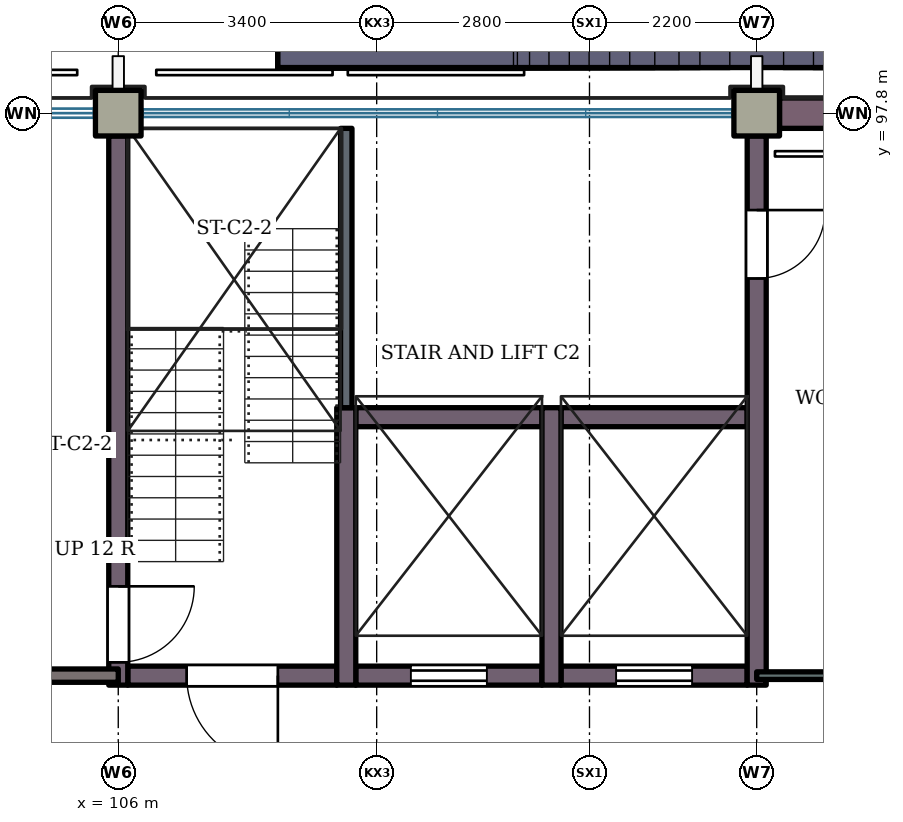
"""IFC4 building model, lengths in metres.
Left out: names, types, materials, properties, quantities, classifications, styles, units other than length and angle.
Written with IfcOpenShell. Run it as: python <this file> out.ifc"""

import sys

from ifc_helpers import new_model, si_unit, direction, frame, frame_2d, origin, origin_2d, place, context, subcontext, project, spatial, rectangle, extrude, element, fill, save


model = new_model("IFC4")
c1 = context("Model", 3, precision=1e-05, world=origin(), true_north=direction((0.0, 1.0)))
c2 = subcontext(c1, "Body", "Model", "MODEL_VIEW")
j1 = project(units=[si_unit("LENGTHUNIT", "METRE"), si_unit("PLANEANGLEUNIT", "RADIAN")], contexts=[c1])
p1 = place(None, origin())
s1 = spatial("IfcSite", under=j1, at=p1, CompositionType="ELEMENT")
p2 = place(p1, origin())
s2 = spatial("IfcBuilding", under=s1, at=p2, CompositionType="ELEMENT")
p3 = place(p2, frame((0.0, 0.0, 8.4)))
s3 = spatial("IfcBuildingStorey", under=s2, at=p3, CompositionType="ELEMENT", Elevation=8.4)
for number, where, z_axis, x_axis in (
    (1, (106.0, 97.8, 0.0), (0.0, 0.0, 1.0), (1.0, 0.0, 0.0)),
    (2, (114.4, 97.8, 0.0), (0.0, 0.0, 1.0), (1.0, 0.0, 0.0)),
):
    element("IfcColumn", number, at=place(p3, frame(where, z_axis=z_axis, x_axis=x_axis)), inside=s3, PredefinedType="COLUMN", context=c2, shape_type="SweptSolid", body=[
        extrude(rectangle(XDim=0.6, YDim=0.6, at=origin_2d()), origin(), (0.0, 0.0, 1.0), 4.2),
    ])
p4 = place(p3, frame((106.125, 90.4, 0.0), z_axis=(0.0, 0.0, 1.0), x_axis=(1.0, 0.0, 0.0)))
e3 = element("IfcWall", 3, at=p4, inside=s3, PredefinedType="SHEAR", context=c2, shape_type="SweptSolid", body=[
    extrude(rectangle(XDim=2.75, YDim=0.25, at=frame_2d((1.375, 0.0))), origin(), (0.0, 0.0, 1.0), 4.2),
])
p5 = place(p4, frame((0.775, 0.0, 0.0)))
e4 = element("IfcOpeningElement", 4, at=p5, cuts=e3, PredefinedType="OPENING", context=c2, shape_type="SweptSolid", body=[
    extrude(rectangle(XDim=1.2, YDim=2.1, at=frame_2d((0.6, 1.05))), frame((0.0, 0.135, 0.0), z_axis=(0.0, -1.0, 0.0), x_axis=(1.0, 0.0, 0.0)), (0.0, 0.0, 1.0), 0.27),
])
p6 = place(p3, frame((109.125, 90.4, 0.0), z_axis=(0.0, 0.0, 1.0), x_axis=(1.0, 0.0, 0.0)))
e5 = element("IfcWall", 5, at=p6, inside=s3, PredefinedType="SHEAR", context=c2, shape_type="SweptSolid", body=[
    extrude(rectangle(XDim=2.45, YDim=0.25, at=frame_2d((1.225, 0.0))), origin(), (0.0, 0.0, 1.0), 4.2),
])
p7 = place(p6, frame((0.725, 0.0, 0.0)))
e6 = element("IfcOpeningElement", 6, at=p7, cuts=e5, PredefinedType="OPENING", context=c2, shape_type="SweptSolid", body=[
    extrude(rectangle(XDim=1.0, YDim=2.1, at=frame_2d((0.5, 1.05))), frame((0.0, 0.135, 0.0), z_axis=(0.0, -1.0, 0.0), x_axis=(1.0, 0.0, 0.0)), (0.0, 0.0, 1.0), 0.27),
])
p8 = place(p3, frame((111.825, 90.4, 0.0), z_axis=(0.0, 0.0, 1.0), x_axis=(1.0, 0.0, 0.0)))
e7 = element("IfcWall", 7, at=p8, inside=s3, PredefinedType="SHEAR", context=c2, shape_type="SweptSolid", body=[
    extrude(rectangle(XDim=2.45, YDim=0.25, at=frame_2d((1.225, 0.0))), origin(), (0.0, 0.0, 1.0), 4.2),
])
p9 = place(p8, frame((0.725, 0.0, 0.0)))
e8 = element("IfcOpeningElement", 8, at=p9, cuts=e7, PredefinedType="OPENING", context=c2, shape_type="SweptSolid", body=[
    extrude(rectangle(XDim=1.0, YDim=2.1, at=frame_2d((0.5, 1.05))), frame((0.0, 0.135, 0.0), z_axis=(0.0, -1.0, 0.0), x_axis=(1.0, 0.0, 0.0)), (0.0, 0.0, 1.0), 0.27),
])
for number, where, z_axis, x_axis in (
    (9, (109.125, 93.8, 0.0), (0.0, 0.0, 1.0), (1.0, 0.0, 0.0)),
    (10, (111.825, 93.8, 0.0), (0.0, 0.0, 1.0), (1.0, 0.0, 0.0)),
):
    element("IfcWall", number, at=place(p3, frame(where, z_axis=z_axis, x_axis=x_axis)), inside=s3, PredefinedType="SHEAR", context=c2, shape_type="SweptSolid", body=[
        extrude(rectangle(XDim=2.45, YDim=0.25, at=frame_2d((1.225, 0.0))), origin(), (0.0, 0.0, 1.0), 4.2),
    ])
p10 = place(p3, frame((106.0, 90.275, 0.0), z_axis=(0.0, 0.0, 1.0), x_axis=(0.0, 1.0, 0.0)))
e11 = element("IfcWall", 11, at=p10, inside=s3, PredefinedType="SHEAR", context=c2, shape_type="SweptSolid", body=[
    extrude(rectangle(XDim=7.225, YDim=0.25, at=frame_2d((3.613, 0.0))), origin(), (0.0, 0.0, 1.0), 4.2),
])
p11 = place(p10, frame((0.3, 0.0, 0.0)))
e12 = element("IfcOpeningElement", 12, at=p11, cuts=e11, PredefinedType="OPENING", context=c2, shape_type="SweptSolid", body=[
    extrude(rectangle(XDim=1.0, YDim=2.1, at=frame_2d((0.5, 1.05))), frame((0.0, 0.135, 0.0), z_axis=(0.0, -1.0, 0.0), x_axis=(1.0, 0.0, 0.0)), (0.0, 0.0, 1.0), 0.27),
])
for number, where, z_axis, x_axis in (
    (13, (109.0, 90.275, 0.0), (0.0, 0.0, 1.0), (0.0, 1.0, 0.0)),
    (14, (111.7, 90.275, 0.0), (0.0, 0.0, 1.0), (0.0, 1.0, 0.0)),
):
    element("IfcWall", number, at=place(p3, frame(where, z_axis=z_axis, x_axis=x_axis)), inside=s3, PredefinedType="SHEAR", context=c2, shape_type="SweptSolid", body=[
        extrude(rectangle(XDim=3.65, YDim=0.25, at=frame_2d((1.825, 0.0))), origin(), (0.0, 0.0, 1.0), 4.2),
    ])
p12 = place(p3, frame((114.4, 90.275, 0.0), z_axis=(0.0, 0.0, 1.0), x_axis=(0.0, 1.0, 0.0)))
e15 = element("IfcWall", 15, at=p12, inside=s3, PredefinedType="SHEAR", context=c2, shape_type="SweptSolid", body=[
    extrude(rectangle(XDim=7.225, YDim=0.25, at=frame_2d((3.613, 0.0))), origin(), (0.0, 0.0, 1.0), 4.2),
])
p13 = place(p12, frame((5.35, 0.0, 0.0)))
e16 = element("IfcOpeningElement", 16, at=p13, cuts=e15, PredefinedType="OPENING", context=c2, shape_type="SweptSolid", body=[
    extrude(rectangle(XDim=0.9, YDim=2.1, at=frame_2d((0.45, 1.05))), frame((0.0, 0.135, 0.0), z_axis=(0.0, -1.0, 0.0), x_axis=(1.0, 0.0, 0.0)), (0.0, 0.0, 1.0), 0.27),
])
p14 = place(p3, frame((114.7, 97.8, 0.0), z_axis=(0.0, 0.0, 1.0), x_axis=(1.0, 0.0, 0.0)))
e17 = element("IfcWall", 17, at=p14, inside=s3, PredefinedType="SOLIDWALL", context=c2, shape_type="SweptSolid", body=[
    extrude(rectangle(XDim=7.8, YDim=0.4, at=frame_2d((3.9, 0.0))), origin(), (0.0, 0.0, 1.0), 3.32),
])
p15 = place(p14, frame((0.8, 0.0, 2.1)))
e18 = element("IfcOpeningElement", 18, at=p15, cuts=e17, PredefinedType="OPENING", context=c2, shape_type="SweptSolid", body=[
    extrude(rectangle(XDim=0.6, YDim=0.9, at=frame_2d((0.3, 0.45))), frame((0.0, 0.21, 0.0), z_axis=(0.0, -1.0, 0.0), x_axis=(1.0, 0.0, 0.0)), (0.0, 0.0, 1.0), 0.42),
])
p16 = place(p14, frame((3.525, 0.0, 2.1)))
e19 = element("IfcOpeningElement", 19, at=p16, cuts=e17, PredefinedType="OPENING", context=c2, shape_type="SweptSolid", body=[
    extrude(rectangle(XDim=0.75, YDim=0.9, at=frame_2d((0.375, 0.45))), frame((0.0, 0.21, 0.0), z_axis=(0.0, -1.0, 0.0), x_axis=(1.0, 0.0, 0.0)), (0.0, 0.0, 1.0), 0.42),
])
p17 = place(p14, frame((6.4, 0.0, 2.1)))
e20 = element("IfcOpeningElement", 20, at=p17, cuts=e17, PredefinedType="OPENING", context=c2, shape_type="SweptSolid", body=[
    extrude(rectangle(XDim=0.6, YDim=0.9, at=frame_2d((0.3, 0.45))), frame((0.0, 0.21, 0.0), z_axis=(0.0, -1.0, 0.0), x_axis=(1.0, 0.0, 0.0)), (0.0, 0.0, 1.0), 0.42),
])
p18 = place(p3, frame((108.1, 98.9, 0.0), z_axis=(0.0, 0.0, 1.0), x_axis=(1.0, 0.0, 0.0)))
e21 = element("IfcWall", 21, at=p18, inside=s3, PredefinedType="STANDARD", context=c2, shape_type="SweptSolid", body=[
    extrude(rectangle(XDim=3.1, YDim=1.0, at=frame_2d((1.55, 0.0))), origin(), (0.0, 0.0, 1.0), 0.6),
])
p19 = place(p3, frame((108.1, 98.9, 0.6), z_axis=(0.0, 0.0, 1.0), x_axis=(1.0, 0.0, 0.0)))
e22 = element("IfcWall", 22, at=p19, inside=s3, PredefinedType="STANDARD", context=c2, shape_type="SweptSolid", body=[
    extrude(rectangle(XDim=3.152, YDim=1.0, at=frame_2d((1.576, 0.0))), origin(), (0.0, 0.0, 1.0), 0.6),
])
p20 = place(p3, frame((108.1, 98.9, 1.2), z_axis=(0.0, 0.0, 1.0), x_axis=(1.0, 0.0, 0.0)))
e23 = element("IfcWall", 23, at=p20, inside=s3, PredefinedType="STANDARD", context=c2, shape_type="SweptSolid", body=[
    extrude(rectangle(XDim=3.311, YDim=1.0, at=frame_2d((1.656, 0.0))), origin(), (0.0, 0.0, 1.0), 0.55),
])
p21 = place(p3, frame((108.1, 98.9, 1.75), z_axis=(0.0, 0.0, 1.0), x_axis=(1.0, 0.0, 0.0)))
e24 = element("IfcWall", 24, at=p21, inside=s3, PredefinedType="STANDARD", context=c2, shape_type="SweptSolid", body=[
    extrude(rectangle(XDim=3.567, YDim=1.0, at=frame_2d((1.783, 0.0))), origin(), (0.0, 0.0, 1.0), 0.4),
])
p22 = place(p3, frame((108.1, 98.9, 2.15), z_axis=(0.0, 0.0, 1.0), x_axis=(1.0, 0.0, 0.0)))
e25 = element("IfcWall", 25, at=p22, inside=s3, PredefinedType="STANDARD", context=c2, shape_type="SweptSolid", body=[
    extrude(rectangle(XDim=3.834, YDim=1.0, at=frame_2d((1.917, 0.0))), origin(), (0.0, 0.0, 1.0), 0.3),
])
p23 = place(p3, frame((108.1, 98.9, 2.45), z_axis=(0.0, 0.0, 1.0), x_axis=(1.0, 0.0, 0.0)))
e26 = element("IfcWall", 26, at=p23, inside=s3, PredefinedType="STANDARD", context=c2, shape_type="SweptSolid", body=[
    extrude(rectangle(XDim=4.095, YDim=1.0, at=frame_2d((2.047, 0.0))), origin(), (0.0, 0.0, 1.0), 0.25),
])
p24 = place(p3, frame((108.1, 98.9, 2.7), z_axis=(0.0, 0.0, 1.0), x_axis=(1.0, 0.0, 0.0)))
e27 = element("IfcWall", 27, at=p24, inside=s3, PredefinedType="STANDARD", context=c2, shape_type="SweptSolid", body=[
    extrude(rectangle(XDim=4.365, YDim=1.0, at=frame_2d((2.182, 0.0))), origin(), (0.0, 0.0, 1.0), 0.2),
])
p25 = place(p3, frame((108.1, 98.9, 2.9), z_axis=(0.0, 0.0, 1.0), x_axis=(1.0, 0.0, 0.0)))
e28 = element("IfcWall", 28, at=p25, inside=s3, PredefinedType="STANDARD", context=c2, shape_type="SweptSolid", body=[
    extrude(rectangle(XDim=4.629, YDim=1.0, at=frame_2d((2.315, 0.0))), origin(), (0.0, 0.0, 1.0), 0.2),
])
p26 = place(p3, frame((108.1, 98.9, 3.1), z_axis=(0.0, 0.0, 1.0), x_axis=(1.0, 0.0, 0.0)))
e29 = element("IfcWall", 29, at=p26, inside=s3, PredefinedType="STANDARD", context=c2, shape_type="SweptSolid", body=[
    extrude(rectangle(XDim=4.959, YDim=1.0, at=frame_2d((2.479, 0.0))), origin(), (0.0, 0.0, 1.0), 0.15),
])
p27 = place(p3, frame((108.1, 98.9, 3.25), z_axis=(0.0, 0.0, 1.0), x_axis=(1.0, 0.0, 0.0)))
e30 = element("IfcWall", 30, at=p27, inside=s3, PredefinedType="STANDARD", context=c2, shape_type="SweptSolid", body=[
    extrude(rectangle(XDim=5.278, YDim=1.0, at=frame_2d((2.639, 0.0))), origin(), (0.0, 0.0, 1.0), 0.1),
])
for number, where, z_axis, x_axis in (
    (31, (108.1, 98.9, 3.35), (0.0, 0.0, 1.0), (1.0, 0.0, 0.0)),
    (32, (120.7, 98.9, 3.35), (0.0, 0.0, 1.0), (-1.0, 0.0, 0.0)),
):
    element("IfcWall", number, at=place(p3, frame(where, z_axis=z_axis, x_axis=x_axis)), inside=s3, PredefinedType="STANDARD", context=c2, shape_type="SweptSolid", body=[
        extrude(rectangle(XDim=5.553, YDim=1.0, at=frame_2d((2.776, 0.0))), origin(), (0.0, 0.0, 1.0), 0.1),
    ])
for number, where, z_axis, x_axis in (
    (33, (108.1, 98.9, 3.45), (0.0, 0.0, 1.0), (1.0, 0.0, 0.0)),
    (34, (120.7, 98.9, 3.45), (0.0, 0.0, 1.0), (-1.0, 0.0, 0.0)),
):
    element("IfcWall", number, at=place(p3, frame(where, z_axis=z_axis, x_axis=x_axis)), inside=s3, PredefinedType="STANDARD", context=c2, shape_type="SweptSolid", body=[
        extrude(rectangle(XDim=5.946, YDim=1.0, at=frame_2d((2.973, 0.0))), origin(), (0.0, 0.0, 1.0), 0.05),
    ])
p28 = place(p3, frame((108.1, 98.9, 3.5), z_axis=(0.0, 0.0, 1.0), x_axis=(1.0, 0.0, 0.0)))
e35 = element("IfcWall", 35, at=p28, inside=s3, PredefinedType="STANDARD", context=c2, shape_type="SweptSolid", body=[
    extrude(rectangle(XDim=12.6, YDim=1.0, at=frame_2d((6.3, 0.0))), origin(), (0.0, 0.0, 1.0), 0.7),
])
p29 = place(p3, frame((89.2, 90.4, 0.0), z_axis=(0.0, 0.0, 1.0), x_axis=(1.0, 0.0, 0.0)))
e36 = element("IfcWall", 36, at=p29, inside=s3, PredefinedType="PARTITIONING", context=c2, shape_type="SweptSolid", body=[
    extrude(rectangle(XDim=16.8, YDim=0.175, at=frame_2d((8.4, 0.0))), origin(), (0.0, 0.0, 1.0), 3.92),
])
p30 = place(p29, frame((3.7, 0.0, 0.0)))
e37 = element("IfcOpeningElement", 37, at=p30, cuts=e36, PredefinedType="OPENING", context=c2, shape_type="SweptSolid", body=[
    extrude(rectangle(XDim=1.0, YDim=2.1, at=frame_2d((0.5, 1.05))), frame((0.0, 0.097, 0.0), z_axis=(0.0, -1.0, 0.0), x_axis=(1.0, 0.0, 0.0)), (0.0, 0.0, 1.0), 0.195),
])
p31 = place(p29, frame((12.1, 0.0, 0.0)))
e38 = element("IfcOpeningElement", 38, at=p31, cuts=e36, PredefinedType="OPENING", context=c2, shape_type="SweptSolid", body=[
    extrude(rectangle(XDim=1.0, YDim=2.1, at=frame_2d((0.5, 1.05))), frame((0.0, 0.097, 0.0), z_axis=(0.0, -1.0, 0.0), x_axis=(1.0, 0.0, 0.0)), (0.0, 0.0, 1.0), 0.195),
])
p32 = place(p3, frame((114.4, 90.4, 0.0), z_axis=(0.0, 0.0, 1.0), x_axis=(1.0, 0.0, 0.0)))
e39 = element("IfcWall", 39, at=p32, inside=s3, PredefinedType="PARTITIONING", context=c2, shape_type="SweptSolid", body=[
    extrude(rectangle(XDim=8.4, YDim=0.1, at=frame_2d((4.2, 0.0))), origin(), (0.0, 0.0, 1.0), 3.92),
])
p33 = place(p32, frame((1.35, 0.0, 0.0)))
e40 = element("IfcOpeningElement", 40, at=p33, cuts=e39, PredefinedType="OPENING", context=c2, shape_type="SweptSolid", body=[
    extrude(rectangle(XDim=0.9, YDim=2.1, at=frame_2d((0.45, 1.05))), frame((0.0, 0.06, 0.0), z_axis=(0.0, -1.0, 0.0), x_axis=(1.0, 0.0, 0.0)), (0.0, 0.0, 1.0), 0.12),
])
p34 = place(p32, frame((4.225, 0.0, 0.0)))
e41 = element("IfcOpeningElement", 41, at=p34, cuts=e39, PredefinedType="OPENING", context=c2, shape_type="SweptSolid", body=[
    extrude(rectangle(XDim=1.15, YDim=2.1, at=frame_2d((0.575, 1.05))), frame((0.0, 0.06, 0.0), z_axis=(0.0, -1.0, 0.0), x_axis=(1.0, 0.0, 0.0)), (0.0, 0.0, 1.0), 0.12),
])
p35 = place(p32, frame((6.15, 0.0, 0.0)))
e42 = element("IfcOpeningElement", 42, at=p35, cuts=e39, PredefinedType="OPENING", context=c2, shape_type="SweptSolid", body=[
    extrude(rectangle(XDim=0.9, YDim=2.1, at=frame_2d((0.45, 1.05))), frame((0.0, 0.06, 0.0), z_axis=(0.0, -1.0, 0.0), x_axis=(1.0, 0.0, 0.0)), (0.0, 0.0, 1.0), 0.12),
])
p36 = place(p3, frame((109.0, 93.925, 0.0), z_axis=(0.0, 0.0, 1.0), x_axis=(0.0, 1.0, 0.0)))
e43 = element("IfcWall", 43, at=p36, inside=s3, PredefinedType="PARTITIONING", context=c2, shape_type="SweptSolid", body=[
    extrude(rectangle(XDim=3.675, YDim=0.15, at=frame_2d((1.837, 0.0))), origin(), (0.0, 0.0, 1.0), 3.92),
])
p37 = place(p11, origin())
e44 = element("IfcDoor", 44, at=p37, inside=s3, OperationType="SINGLE_SWING_RIGHT", PredefinedType="DOOR", context=c2, shape_type="SweptSolid", body=[
    extrude(rectangle(XDim=1.0, YDim=2.1, at=frame_2d((0.5, 1.05))), frame((0.0, 0.025, 0.0), z_axis=(0.0, -1.0, 0.0), x_axis=(1.0, 0.0, 0.0)), (0.0, 0.0, 1.0), 0.05),
])
fill(e12, e44)
p38 = place(p13, origin())
e45 = element("IfcDoor", 45, at=p38, inside=s3, OperationType="SINGLE_SWING_RIGHT", PredefinedType="DOOR", context=c2, shape_type="SweptSolid", body=[
    extrude(rectangle(XDim=0.9, YDim=2.1, at=frame_2d((0.45, 1.05))), frame((0.0, 0.025, 0.0), z_axis=(0.0, -1.0, 0.0), x_axis=(1.0, 0.0, 0.0)), (0.0, 0.0, 1.0), 0.05),
])
fill(e16, e45)
p39 = place(p5, origin())
e46 = element("IfcDoor", 46, at=p39, inside=s3, OperationType="SINGLE_SWING_RIGHT", PredefinedType="DOOR", context=c2, shape_type="SweptSolid", body=[
    extrude(rectangle(XDim=1.2, YDim=2.1, at=frame_2d((0.6, 1.05))), frame((0.0, 0.025, 0.0), z_axis=(0.0, -1.0, 0.0), x_axis=(1.0, 0.0, 0.0)), (0.0, 0.0, 1.0), 0.05),
])
fill(e4, e46)
p40 = place(p7, origin())
e47 = element("IfcDoor", 47, at=p40, inside=s3, OperationType="SLIDING_TO_LEFT", PredefinedType="DOOR", context=c2, shape_type="SweptSolid", body=[
    extrude(rectangle(XDim=1.0, YDim=2.1, at=frame_2d((0.5, 1.05))), frame((0.0, 0.025, 0.0), z_axis=(0.0, -1.0, 0.0), x_axis=(1.0, 0.0, 0.0)), (0.0, 0.0, 1.0), 0.05),
])
fill(e6, e47)
p41 = place(p9, origin())
e48 = element("IfcDoor", 48, at=p41, inside=s3, OperationType="SLIDING_TO_LEFT", PredefinedType="DOOR", context=c2, shape_type="SweptSolid", body=[
    extrude(rectangle(XDim=1.0, YDim=2.1, at=frame_2d((0.5, 1.05))), frame((0.0, 0.025, 0.0), z_axis=(0.0, -1.0, 0.0), x_axis=(1.0, 0.0, 0.0)), (0.0, 0.0, 1.0), 0.05),
])
fill(e8, e48)
save(model, sys.argv[1])
